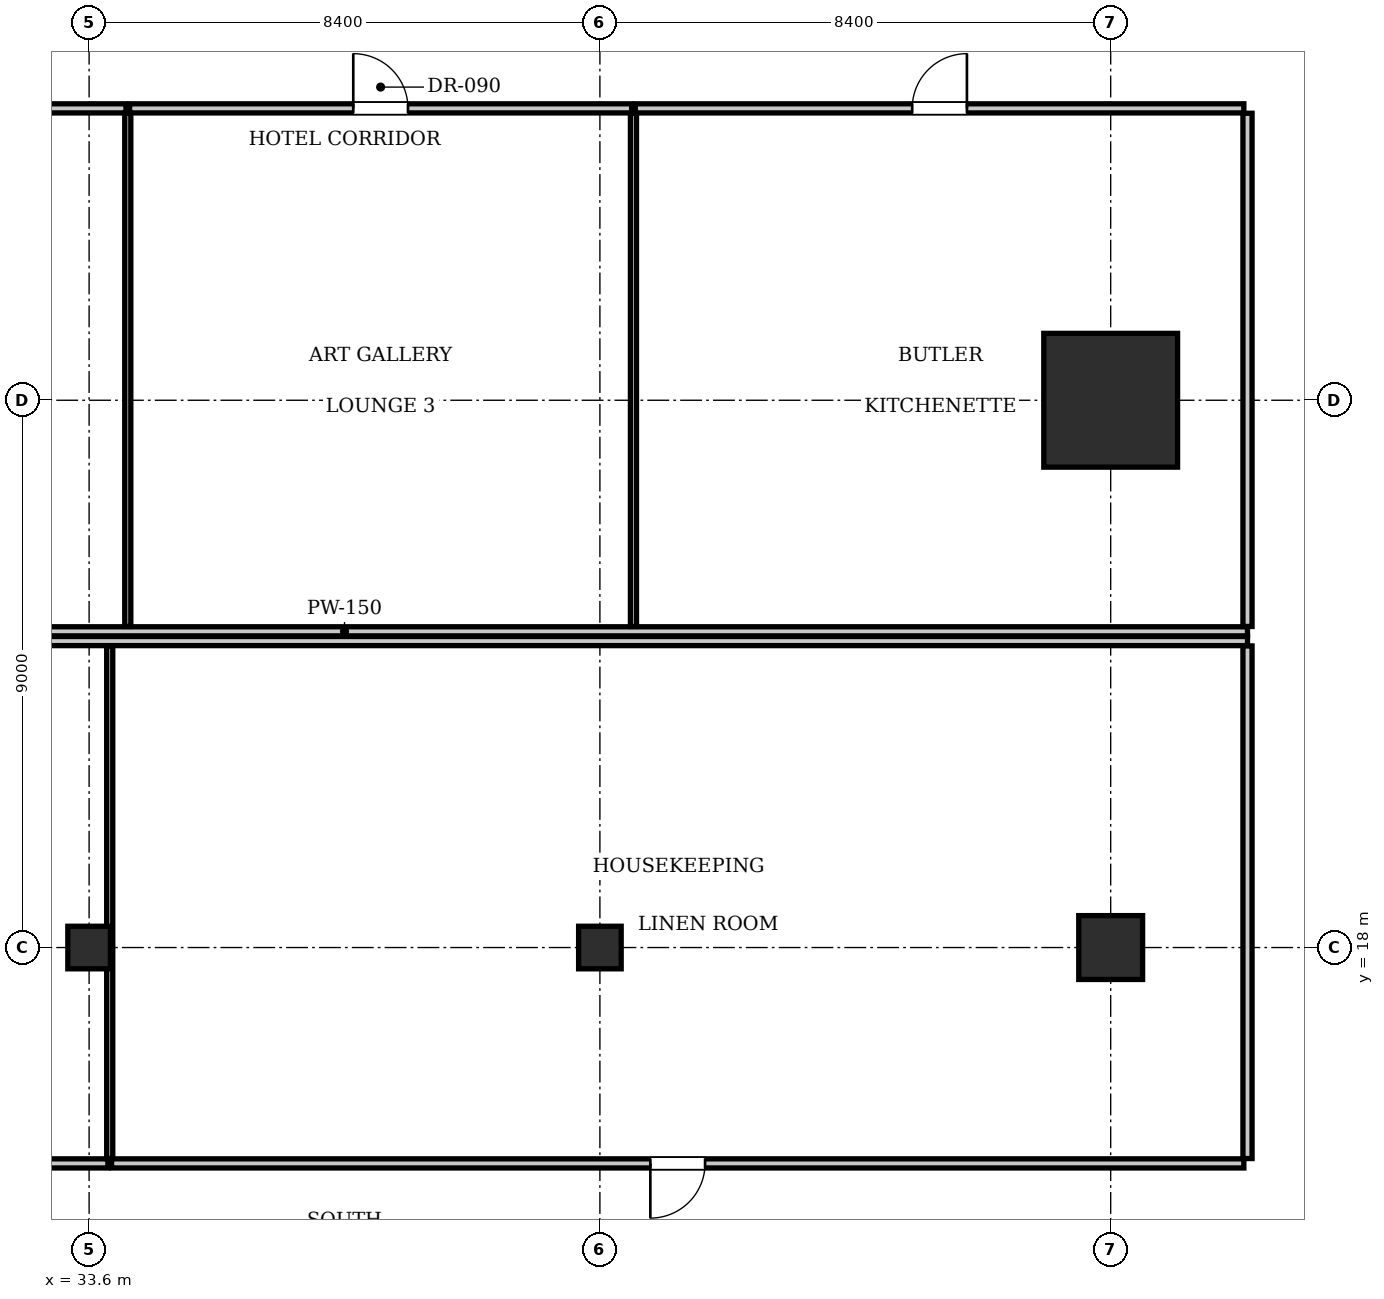
"""IFC4 building model, lengths in metres.
Left out: names, types, materials, properties, quantities, classifications, styles, units other than length and angle.
Written with IfcOpenShell. Run it as: python <this file> out.ifc"""

import sys

from ifc_helpers import new_model, si_unit, direction, frame, frame_2d, origin, origin_2d, place, context, subcontext, project, spatial, rectangle, i_section, extrude, element, fill, save


model = new_model("IFC4")
c1 = context("Model", 3, precision=1e-05, world=origin(), true_north=direction((0.0, 1.0)))
c2 = subcontext(c1, "Body", "Model", "MODEL_VIEW")
j1 = project(units=[si_unit("LENGTHUNIT", "METRE"), si_unit("PLANEANGLEUNIT", "RADIAN")], contexts=[c1])
p1 = place(None, origin())
s1 = spatial("IfcSite", under=j1, at=p1, CompositionType="ELEMENT")
p2 = place(p1, origin())
s2 = spatial("IfcBuilding", under=s1, at=p2, CompositionType="ELEMENT")
p3 = place(p2, frame((0.0, 0.0, 92.4)))
s3 = spatial("IfcBuildingStorey", under=s2, at=p3, CompositionType="ELEMENT", Elevation=92.4)
p4 = place(p3, frame((50.4, 27.0, 0.0), z_axis=(0.0, 0.0, 1.0), x_axis=(1.0, 0.0, 0.0)))
e1 = element("IfcColumn", 1, at=p4, inside=s3, PredefinedType="COLUMN", context=c2, shape_type="SweptSolid", body=[
    extrude(rectangle(XDim=2.2, YDim=2.2, at=origin_2d()), origin(), (0.0, 0.0, 1.0), 3.85),
])
p5 = place(p3, frame((50.4, 18.0, 0.0), z_axis=(0.0, 0.0, 1.0), x_axis=(1.0, 0.0, 0.0)))
e2 = element("IfcColumn", 2, at=p5, inside=s3, PredefinedType="COLUMN", context=c2, shape_type="SweptSolid", body=[
    extrude(rectangle(XDim=1.05, YDim=1.05, at=origin_2d()), origin(), (0.0, 0.0, 1.0), 3.85),
])
for number, where, z_axis, x_axis in (
    (3, (33.6, 18.0, 0.0), (0.0, 0.0, 1.0), (1.0, 0.0, 0.0)),
    (4, (42.0, 18.0, 0.0), (0.0, 0.0, 1.0), (1.0, 0.0, 0.0)),
):
    element("IfcColumn", number, at=place(p3, frame(where, z_axis=z_axis, x_axis=x_axis)), inside=s3, PredefinedType="COLUMN", context=c2, shape_type="SweptSolid", body=[
        extrude(i_section(OverallWidth=0.7, OverallDepth=0.7, WebThickness=0.028, FlangeThickness=0.044, at=origin_2d()), origin(), (0.0, 0.0, 1.0), 3.85),
    ])
p6 = place(p3, frame((22.95, 23.2, 0.0), z_axis=(0.0, 0.0, 1.0), x_axis=(1.0, 0.0, 0.0)))
e5 = element("IfcWall", 5, at=p6, inside=s3, PredefinedType="PARTITIONING", context=c2, shape_type="SweptSolid", body=[
    extrude(rectangle(XDim=29.7, YDim=0.15, at=frame_2d((14.85, 0.0))), origin(), (0.0, 0.0, 1.0), 3.61),
])
p7 = place(p3, frame((52.65, 23.28, 0.0), z_axis=(0.0, 0.0, 1.0), x_axis=(0.0, 1.0, 0.0)))
e6 = element("IfcWall", 6, at=p7, inside=s3, PredefinedType="PARTITIONING", context=c2, shape_type="SweptSolid", body=[
    extrude(rectangle(XDim=8.44, YDim=0.15, at=frame_2d((4.22, 0.0))), origin(), (0.0, 0.0, 1.0), 3.61),
])
p8 = place(p3, frame((27.732, 31.8, 0.0), z_axis=(0.0, 0.0, 1.0), x_axis=(1.0, 0.0, 0.0)))
e7 = element("IfcWall", 7, at=p8, inside=s3, PredefinedType="PARTITIONING", context=c2, shape_type="SweptSolid", body=[
    extrude(rectangle(XDim=6.474, YDim=0.15, at=frame_2d((3.237, 0.0))), origin(), (0.0, 0.0, 1.0), 3.61),
])
p9 = place(p8, frame((2.787, 0.0, 0.0)))
e8 = element("IfcOpeningElement", 8, at=p9, cuts=e7, PredefinedType="OPENING", context=c2, shape_type="SweptSolid", body=[
    extrude(rectangle(XDim=0.9, YDim=2.1, at=frame_2d((0.45, 1.05))), frame((0.0, 0.085, 0.0), z_axis=(0.0, -1.0, 0.0), x_axis=(1.0, 0.0, 0.0)), (0.0, 0.0, 1.0), 0.17),
])
p10 = place(p3, frame((34.236, 23.28, 0.0), z_axis=(0.0, 0.0, 1.0), x_axis=(0.0, 1.0, 0.0)))
e9 = element("IfcWall", 9, at=p10, inside=s3, PredefinedType="PARTITIONING", context=c2, shape_type="SweptSolid", body=[
    extrude(rectangle(XDim=8.44, YDim=0.1, at=frame_2d((4.22, 0.0))), origin(), (0.0, 0.0, 1.0), 3.61),
])
p11 = place(p3, frame((34.266, 31.8, 0.0), z_axis=(0.0, 0.0, 1.0), x_axis=(1.0, 0.0, 0.0)))
e10 = element("IfcWall", 10, at=p11, inside=s3, PredefinedType="PARTITIONING", context=c2, shape_type="SweptSolid", body=[
    extrude(rectangle(XDim=8.256, YDim=0.15, at=frame_2d((4.128, 0.0))), origin(), (0.0, 0.0, 1.0), 3.61),
])
p12 = place(p11, frame((3.678, 0.0, 0.0)))
e11 = element("IfcOpeningElement", 11, at=p12, cuts=e10, PredefinedType="OPENING", context=c2, shape_type="SweptSolid", body=[
    extrude(rectangle(XDim=0.9, YDim=2.1, at=frame_2d((0.45, 1.05))), frame((0.0, 0.085, 0.0), z_axis=(0.0, -1.0, 0.0), x_axis=(1.0, 0.0, 0.0)), (0.0, 0.0, 1.0), 0.17),
])
p13 = place(p3, frame((42.552, 23.28, 0.0), z_axis=(0.0, 0.0, 1.0), x_axis=(0.0, 1.0, 0.0)))
e12 = element("IfcWall", 12, at=p13, inside=s3, PredefinedType="PARTITIONING", context=c2, shape_type="SweptSolid", body=[
    extrude(rectangle(XDim=8.44, YDim=0.1, at=frame_2d((4.22, 0.0))), origin(), (0.0, 0.0, 1.0), 3.61),
])
p14 = place(p3, frame((42.582, 31.8, 0.0), z_axis=(0.0, 0.0, 1.0), x_axis=(1.0, 0.0, 0.0)))
e13 = element("IfcWall", 13, at=p14, inside=s3, PredefinedType="PARTITIONING", context=c2, shape_type="SweptSolid", body=[
    extrude(rectangle(XDim=10.008, YDim=0.15, at=frame_2d((5.004, 0.0))), origin(), (0.0, 0.0, 1.0), 3.61),
])
p15 = place(p14, frame((4.554, 0.0, 0.0)))
e14 = element("IfcOpeningElement", 14, at=p15, cuts=e13, PredefinedType="OPENING", context=c2, shape_type="SweptSolid", body=[
    extrude(rectangle(XDim=0.9, YDim=2.1, at=frame_2d((0.45, 1.05))), frame((0.0, 0.085, 0.0), z_axis=(0.0, -1.0, 0.0), x_axis=(1.0, 0.0, 0.0)), (0.0, 0.0, 1.0), 0.17),
])
p16 = place(p3, frame((22.95, 23.04, 0.0), z_axis=(0.0, 0.0, 1.0), x_axis=(1.0, 0.0, 0.0)))
e15 = element("IfcWall", 15, at=p16, inside=s3, PredefinedType="PARTITIONING", context=c2, shape_type="SweptSolid", body=[
    extrude(rectangle(XDim=29.7, YDim=0.15, at=frame_2d((14.85, 0.0))), origin(), (0.0, 0.0, 1.0), 3.61),
])
p17 = place(p3, frame((52.65, 14.53, 0.0), z_axis=(0.0, 0.0, 1.0), x_axis=(0.0, 1.0, 0.0)))
e16 = element("IfcWall", 16, at=p17, inside=s3, PredefinedType="PARTITIONING", context=c2, shape_type="SweptSolid", body=[
    extrude(rectangle(XDim=8.43, YDim=0.15, at=frame_2d((4.215, 0.0))), origin(), (0.0, 0.0, 1.0), 3.61),
])
p18 = place(p3, frame((23.01, 14.45, 0.0), z_axis=(0.0, 0.0, 1.0), x_axis=(1.0, 0.0, 0.0)))
e17 = element("IfcWall", 17, at=p18, inside=s3, PredefinedType="PARTITIONING", context=c2, shape_type="SweptSolid", body=[
    extrude(rectangle(XDim=10.899, YDim=0.15, at=frame_2d((5.449, 0.0))), origin(), (0.0, 0.0, 1.0), 3.61),
])
p19 = place(p18, frame((5.0, 0.0, 0.0)))
e18 = element("IfcOpeningElement", 18, at=p19, cuts=e17, PredefinedType="OPENING", context=c2, shape_type="SweptSolid", body=[
    extrude(rectangle(XDim=0.9, YDim=2.1, at=frame_2d((0.45, 1.05))), frame((0.0, 0.085, 0.0), z_axis=(0.0, -1.0, 0.0), x_axis=(1.0, 0.0, 0.0)), (0.0, 0.0, 1.0), 0.17),
])
p20 = place(p3, frame((33.939, 14.53, 0.0), z_axis=(0.0, 0.0, 1.0), x_axis=(0.0, 1.0, 0.0)))
e19 = element("IfcWall", 19, at=p20, inside=s3, PredefinedType="PARTITIONING", context=c2, shape_type="SweptSolid", body=[
    extrude(rectangle(XDim=8.43, YDim=0.1, at=frame_2d((4.215, 0.0))), origin(), (0.0, 0.0, 1.0), 3.61),
])
p21 = place(p3, frame((33.969, 14.45, 0.0), z_axis=(0.0, 0.0, 1.0), x_axis=(1.0, 0.0, 0.0)))
e20 = element("IfcWall", 20, at=p21, inside=s3, PredefinedType="PARTITIONING", context=c2, shape_type="SweptSolid", body=[
    extrude(rectangle(XDim=18.621, YDim=0.15, at=frame_2d((9.311, 0.0))), origin(), (0.0, 0.0, 1.0), 3.61),
])
p22 = place(p21, frame((8.861, 0.0, 0.0)))
e21 = element("IfcOpeningElement", 21, at=p22, cuts=e20, PredefinedType="OPENING", context=c2, shape_type="SweptSolid", body=[
    extrude(rectangle(XDim=0.9, YDim=2.1, at=frame_2d((0.45, 1.05))), frame((0.0, 0.085, 0.0), z_axis=(0.0, -1.0, 0.0), x_axis=(1.0, 0.0, 0.0)), (0.0, 0.0, 1.0), 0.17),
])
p23 = place(p12, origin())
e22 = element("IfcDoor", 22, at=p23, inside=s3, OperationType="SINGLE_SWING_LEFT", PredefinedType="DOOR", context=c2, shape_type="SweptSolid", body=[
    extrude(rectangle(XDim=0.9, YDim=2.1, at=frame_2d((0.45, 1.05))), frame((0.0, 0.025, 0.0), z_axis=(0.0, -1.0, 0.0), x_axis=(1.0, 0.0, 0.0)), (0.0, 0.0, 1.0), 0.05),
])
fill(e11, e22)
p24 = place(p15, origin())
e23 = element("IfcDoor", 23, at=p24, inside=s3, OperationType="SINGLE_SWING_RIGHT", PredefinedType="DOOR", context=c2, shape_type="SweptSolid", body=[
    extrude(rectangle(XDim=0.9, YDim=2.1, at=frame_2d((0.45, 1.05))), frame((0.0, 0.025, 0.0), z_axis=(0.0, -1.0, 0.0), x_axis=(1.0, 0.0, 0.0)), (0.0, 0.0, 1.0), 0.05),
])
fill(e14, e23)
p25 = place(p22, frame((0.9, 0.0, 0.0), z_axis=(0.0, 0.0, 1.0), x_axis=(-1.0, 0.0, 0.0)))
e24 = element("IfcDoor", 24, at=p25, inside=s3, OperationType="SINGLE_SWING_RIGHT", PredefinedType="DOOR", context=c2, shape_type="SweptSolid", body=[
    extrude(rectangle(XDim=0.9, YDim=2.1, at=frame_2d((0.45, 1.05))), frame((0.0, 0.025, 0.0), z_axis=(0.0, -1.0, 0.0), x_axis=(1.0, 0.0, 0.0)), (0.0, 0.0, 1.0), 0.05),
])
fill(e21, e24)
save(model, sys.argv[1])
